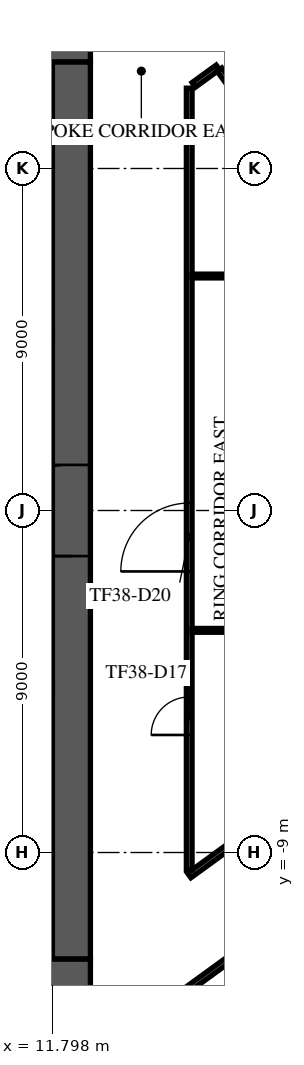
"""IFC4 building model, lengths in metres.
Left out: names, types, materials, properties, quantities, classifications, styles, units other than length and angle.
Written with IfcOpenShell. Run it as: python <this file> out.ifc"""

import sys

from ifc_helpers import new_model, si_unit, direction, frame, frame_2d, origin, place, context, subcontext, project, spatial, rectangle, extrude, element, fill, save


model = new_model("IFC4")
c1 = context("Model", 3, precision=1e-05, world=origin(), true_north=direction((0.0, 1.0)))
c2 = subcontext(c1, "Body", "Model", "MODEL_VIEW")
j1 = project(units=[si_unit("LENGTHUNIT", "METRE"), si_unit("PLANEANGLEUNIT", "RADIAN")], contexts=[c1])
p1 = place(None, origin())
s1 = spatial("IfcSite", under=j1, at=p1, CompositionType="ELEMENT")
p2 = place(p1, origin())
s2 = spatial("IfcBuilding", under=s1, at=p2, CompositionType="ELEMENT")
p3 = place(p2, frame((0.0, 0.0, 163.7)))
s3 = spatial("IfcBuildingStorey", under=s2, at=p3, CompositionType="ELEMENT", Elevation=163.7)
p4 = place(p3, frame((-12.8, 12.3, 0.0), z_axis=(0.0, 0.0, 1.0), x_axis=(1.0, 0.0, 0.0)))
e1 = element("IfcWall", 1, at=p4, inside=s3, PredefinedType="SHEAR", context=c2, shape_type="SweptSolid", body=[
    extrude(rectangle(XDim=25.6, YDim=1.0, at=frame_2d((12.8, 0.0))), origin(), (0.0, 0.0, 1.0), 3.6),
])
p5 = place(p4, frame((11.6, 0.0, 0.0)))
e2 = element("IfcOpeningElement", 2, at=p5, cuts=e1, PredefinedType="OPENING", context=c2, shape_type="SweptSolid", body=[
    extrude(rectangle(XDim=2.4, YDim=2.4, at=frame_2d((1.2, 1.2))), frame((0.0, 0.51, 0.0), z_axis=(0.0, -1.0, 0.0), x_axis=(1.0, 0.0, 0.0)), (0.0, 0.0, 1.0), 1.02),
])
p6 = place(p4, frame((22.425, 0.0, 0.0)))
e3 = element("IfcOpeningElement", 3, at=p6, cuts=e1, PredefinedType="OPENING", context=c2, shape_type="SweptSolid", body=[
    extrude(rectangle(XDim=1.2, YDim=2.1, at=frame_2d((0.6, 1.05))), frame((0.0, 0.51, 0.0), z_axis=(0.0, -1.0, 0.0), x_axis=(1.0, 0.0, 0.0)), (0.0, 0.0, 1.0), 1.02),
])
p7 = place(p4, frame((1.4, 0.0, 0.0)))
e4 = element("IfcOpeningElement", 4, at=p7, cuts=e1, PredefinedType="OPENING", context=c2, shape_type="SweptSolid", body=[
    extrude(rectangle(XDim=1.0, YDim=2.1, at=frame_2d((0.5, 1.05))), frame((0.0, 0.51, 0.0), z_axis=(0.0, -1.0, 0.0), x_axis=(1.0, 0.0, 0.0)), (0.0, 0.0, 1.0), 1.02),
])
p8 = place(p3, frame((-12.8, -12.3, 0.0), z_axis=(0.0, 0.0, 1.0), x_axis=(1.0, 0.0, 0.0)))
e5 = element("IfcWall", 5, at=p8, inside=s3, PredefinedType="SHEAR", context=c2, shape_type="SweptSolid", body=[
    extrude(rectangle(XDim=25.6, YDim=1.0, at=frame_2d((12.8, 0.0))), origin(), (0.0, 0.0, 1.0), 3.6),
])
p9 = place(p8, frame((7.7, 0.0, 0.0)))
e6 = element("IfcOpeningElement", 6, at=p9, cuts=e5, PredefinedType="OPENING", context=c2, shape_type="SweptSolid", body=[
    extrude(rectangle(XDim=2.0, YDim=2.1, at=frame_2d((1.0, 1.05))), frame((0.0, 0.51, 0.0), z_axis=(0.0, -1.0, 0.0), x_axis=(1.0, 0.0, 0.0)), (0.0, 0.0, 1.0), 1.02),
])
p10 = place(p8, frame((17.825, 0.0, 0.0)))
e7 = element("IfcOpeningElement", 7, at=p10, cuts=e5, PredefinedType="OPENING", context=c2, shape_type="SweptSolid", body=[
    extrude(rectangle(XDim=1.2, YDim=2.1, at=frame_2d((0.6, 1.05))), frame((0.0, 0.51, 0.0), z_axis=(0.0, -1.0, 0.0), x_axis=(1.0, 0.0, 0.0)), (0.0, 0.0, 1.0), 1.02),
])
p11 = place(p8, frame((1.975, 0.0, 0.0)))
e8 = element("IfcOpeningElement", 8, at=p11, cuts=e5, PredefinedType="OPENING", context=c2, shape_type="SweptSolid", body=[
    extrude(rectangle(XDim=1.2, YDim=2.1, at=frame_2d((0.6, 1.05))), frame((0.0, 0.51, 0.0), z_axis=(0.0, -1.0, 0.0), x_axis=(1.0, 0.0, 0.0)), (0.0, 0.0, 1.0), 1.02),
])
p12 = place(p8, frame((22.425, 0.0, 0.0)))
e9 = element("IfcOpeningElement", 9, at=p12, cuts=e5, PredefinedType="OPENING", context=c2, shape_type="SweptSolid", body=[
    extrude(rectangle(XDim=1.2, YDim=2.1, at=frame_2d((0.6, 1.05))), frame((0.0, 0.51, 0.0), z_axis=(0.0, -1.0, 0.0), x_axis=(1.0, 0.0, 0.0)), (0.0, 0.0, 1.0), 1.02),
])
p13 = place(p3, frame((12.3, -11.8, 0.0), z_axis=(0.0, 0.0, 1.0), x_axis=(0.0, 1.0, 0.0)))
e10 = element("IfcWall", 10, at=p13, inside=s3, PredefinedType="SHEAR", context=c2, shape_type="SweptSolid", body=[
    extrude(rectangle(XDim=23.6, YDim=1.0, at=frame_2d((11.8, 0.0))), origin(), (0.0, 0.0, 1.0), 3.6),
])
p14 = place(p13, frame((10.6, 0.0, 0.0)))
e11 = element("IfcOpeningElement", 11, at=p14, cuts=e10, PredefinedType="OPENING", context=c2, shape_type="SweptSolid", body=[
    extrude(rectangle(XDim=2.4, YDim=2.4, at=frame_2d((1.2, 1.2))), frame((0.0, 0.51, 0.0), z_axis=(0.0, -1.0, 0.0), x_axis=(1.0, 0.0, 0.0)), (0.0, 0.0, 1.0), 1.02),
])
for number, where, z_axis, x_axis in (
    (12, (8.65, 4.675, 0.0), (0.0, 0.0, 1.0), (1.0, 0.0, 0.0)),
    (13, (8.65, -4.675, 0.0), (0.0, 0.0, 1.0), (1.0, 0.0, 0.0)),
):
    element("IfcWall", number, at=place(p3, frame(where, z_axis=z_axis, x_axis=x_axis)), inside=s3, PredefinedType="SOLIDWALL", context=c2, shape_type="SweptSolid", body=[
        extrude(rectangle(XDim=3.15, YDim=0.25, at=frame_2d((1.575, 0.0))), origin(), (0.0, 0.0, 1.0), 3.6),
    ])
p15 = place(p3, frame((-4.784, -35.737, 0.0), z_axis=(0.0, 0.0, 1.0), x_axis=(0.809019283075, 0.587782102154, 0.0)))
e14 = element("IfcWall", 14, at=p15, inside=s3, PredefinedType="STANDARD", context=c2, shape_type="SweptSolid", body=[
    extrude(rectangle(XDim=49.751, YDim=0.6, at=frame_2d((24.875, 0.0))), origin(), (0.0, 0.0, 1.0), 3.6),
])
p16 = place(p15, frame((1.161, 0.0, 0.9)))
e15 = element("IfcOpeningElement", 15, at=p16, cuts=e14, PredefinedType="OPENING", context=c2, shape_type="SweptSolid", body=[
    extrude(rectangle(XDim=2.1, YDim=2.1, at=frame_2d((1.05, 1.05))), frame((0.0, 0.31, 0.0), z_axis=(0.0, -1.0, 0.0), x_axis=(1.0, 0.0, 0.0)), (0.0, 0.0, 1.0), 0.62),
])
p17 = place(p15, frame((5.644, 0.0, 0.9)))
e16 = element("IfcOpeningElement", 16, at=p17, cuts=e14, PredefinedType="OPENING", context=c2, shape_type="SweptSolid", body=[
    extrude(rectangle(XDim=2.1, YDim=2.1, at=frame_2d((1.05, 1.05))), frame((0.0, 0.31, 0.0), z_axis=(0.0, -1.0, 0.0), x_axis=(1.0, 0.0, 0.0)), (0.0, 0.0, 1.0), 0.62),
])
p18 = place(p15, frame((10.189, 0.0, 0.9)))
e17 = element("IfcOpeningElement", 17, at=p18, cuts=e14, PredefinedType="OPENING", context=c2, shape_type="SweptSolid", body=[
    extrude(rectangle(XDim=2.1, YDim=2.1, at=frame_2d((1.05, 1.05))), frame((0.0, 0.31, 0.0), z_axis=(0.0, -1.0, 0.0), x_axis=(1.0, 0.0, 0.0)), (0.0, 0.0, 1.0), 0.62),
])
p19 = place(p15, frame((14.735, 0.0, 0.9)))
e18 = element("IfcOpeningElement", 18, at=p19, cuts=e14, PredefinedType="OPENING", context=c2, shape_type="SweptSolid", body=[
    extrude(rectangle(XDim=2.1, YDim=2.1, at=frame_2d((1.05, 1.05))), frame((0.0, 0.31, 0.0), z_axis=(0.0, -1.0, 0.0), x_axis=(1.0, 0.0, 0.0)), (0.0, 0.0, 1.0), 0.62),
])
p20 = place(p15, frame((19.28, 0.0, 0.9)))
e19 = element("IfcOpeningElement", 19, at=p20, cuts=e14, PredefinedType="OPENING", context=c2, shape_type="SweptSolid", body=[
    extrude(rectangle(XDim=2.1, YDim=2.1, at=frame_2d((1.05, 1.05))), frame((0.0, 0.31, 0.0), z_axis=(0.0, -1.0, 0.0), x_axis=(1.0, 0.0, 0.0)), (0.0, 0.0, 1.0), 0.62),
])
p21 = place(p15, frame((23.826, 0.0, 0.9)))
e20 = element("IfcOpeningElement", 20, at=p21, cuts=e14, PredefinedType="OPENING", context=c2, shape_type="SweptSolid", body=[
    extrude(rectangle(XDim=2.1, YDim=2.1, at=frame_2d((1.05, 1.05))), frame((0.0, 0.31, 0.0), z_axis=(0.0, -1.0, 0.0), x_axis=(1.0, 0.0, 0.0)), (0.0, 0.0, 1.0), 0.62),
])
p22 = place(p15, frame((28.371, 0.0, 0.9)))
e21 = element("IfcOpeningElement", 21, at=p22, cuts=e14, PredefinedType="OPENING", context=c2, shape_type="SweptSolid", body=[
    extrude(rectangle(XDim=2.1, YDim=2.1, at=frame_2d((1.05, 1.05))), frame((0.0, 0.31, 0.0), z_axis=(0.0, -1.0, 0.0), x_axis=(1.0, 0.0, 0.0)), (0.0, 0.0, 1.0), 0.62),
])
p23 = place(p15, frame((32.917, 0.0, 0.9)))
e22 = element("IfcOpeningElement", 22, at=p23, cuts=e14, PredefinedType="OPENING", context=c2, shape_type="SweptSolid", body=[
    extrude(rectangle(XDim=2.1, YDim=2.1, at=frame_2d((1.05, 1.05))), frame((0.0, 0.31, 0.0), z_axis=(0.0, -1.0, 0.0), x_axis=(1.0, 0.0, 0.0)), (0.0, 0.0, 1.0), 0.62),
])
p24 = place(p15, frame((37.462, 0.0, 0.9)))
e23 = element("IfcOpeningElement", 23, at=p24, cuts=e14, PredefinedType="OPENING", context=c2, shape_type="SweptSolid", body=[
    extrude(rectangle(XDim=2.1, YDim=2.1, at=frame_2d((1.05, 1.05))), frame((0.0, 0.31, 0.0), z_axis=(0.0, -1.0, 0.0), x_axis=(1.0, 0.0, 0.0)), (0.0, 0.0, 1.0), 0.62),
])
p25 = place(p15, frame((42.008, 0.0, 0.9)))
e24 = element("IfcOpeningElement", 24, at=p25, cuts=e14, PredefinedType="OPENING", context=c2, shape_type="SweptSolid", body=[
    extrude(rectangle(XDim=2.1, YDim=2.1, at=frame_2d((1.05, 1.05))), frame((0.0, 0.31, 0.0), z_axis=(0.0, -1.0, 0.0), x_axis=(1.0, 0.0, 0.0)), (0.0, 0.0, 1.0), 0.62),
])
p26 = place(p15, frame((46.491, 0.0, 0.9)))
e25 = element("IfcOpeningElement", 25, at=p26, cuts=e14, PredefinedType="OPENING", context=c2, shape_type="SweptSolid", body=[
    extrude(rectangle(XDim=2.1, YDim=2.1, at=frame_2d((1.05, 1.05))), frame((0.0, 0.31, 0.0), z_axis=(0.0, -1.0, 0.0), x_axis=(1.0, 0.0, 0.0)), (0.0, 0.0, 1.0), 0.62),
])
p27 = place(p3, frame((36.533, 0.245, 0.0), z_axis=(0.0, 0.0, 1.0), x_axis=(-0.58778579343, 0.809016601215, 0.0)))
e26 = element("IfcWall", 26, at=p27, inside=s3, PredefinedType="STANDARD", context=c2, shape_type="SweptSolid", body=[
    extrude(rectangle(XDim=42.176, YDim=0.6, at=frame_2d((21.088, 0.0))), origin(), (0.0, 0.0, 1.0), 3.6),
])
p28 = place(p27, frame((1.138, 0.0, 0.9)))
e27 = element("IfcOpeningElement", 27, at=p28, cuts=e26, PredefinedType="OPENING", context=c2, shape_type="SweptSolid", body=[
    extrude(rectangle(XDim=2.3, YDim=2.1, at=frame_2d((1.15, 1.05))), frame((0.0, 0.31, 0.0), z_axis=(0.0, -1.0, 0.0), x_axis=(1.0, 0.0, 0.0)), (0.0, 0.0, 1.0), 0.62),
])
p29 = place(p27, frame((5.776, 0.0, 0.9)))
e28 = element("IfcOpeningElement", 28, at=p29, cuts=e26, PredefinedType="OPENING", context=c2, shape_type="SweptSolid", body=[
    extrude(rectangle(XDim=2.3, YDim=2.1, at=frame_2d((1.15, 1.05))), frame((0.0, 0.31, 0.0), z_axis=(0.0, -1.0, 0.0), x_axis=(1.0, 0.0, 0.0)), (0.0, 0.0, 1.0), 0.62),
])
p30 = place(p27, frame((10.476, 0.0, 0.9)))
e29 = element("IfcOpeningElement", 29, at=p30, cuts=e26, PredefinedType="OPENING", context=c2, shape_type="SweptSolid", body=[
    extrude(rectangle(XDim=2.3, YDim=2.1, at=frame_2d((1.15, 1.05))), frame((0.0, 0.31, 0.0), z_axis=(0.0, -1.0, 0.0), x_axis=(1.0, 0.0, 0.0)), (0.0, 0.0, 1.0), 0.62),
])
p31 = place(p27, frame((15.176, 0.0, 0.9)))
e30 = element("IfcOpeningElement", 30, at=p31, cuts=e26, PredefinedType="OPENING", context=c2, shape_type="SweptSolid", body=[
    extrude(rectangle(XDim=2.3, YDim=2.1, at=frame_2d((1.15, 1.05))), frame((0.0, 0.31, 0.0), z_axis=(0.0, -1.0, 0.0), x_axis=(1.0, 0.0, 0.0)), (0.0, 0.0, 1.0), 0.62),
])
p32 = place(p27, frame((19.876, 0.0, 0.9)))
e31 = element("IfcOpeningElement", 31, at=p32, cuts=e26, PredefinedType="OPENING", context=c2, shape_type="SweptSolid", body=[
    extrude(rectangle(XDim=2.3, YDim=2.1, at=frame_2d((1.15, 1.05))), frame((0.0, 0.31, 0.0), z_axis=(0.0, -1.0, 0.0), x_axis=(1.0, 0.0, 0.0)), (0.0, 0.0, 1.0), 0.62),
])
p33 = place(p27, frame((24.576, 0.0, 0.9)))
e32 = element("IfcOpeningElement", 32, at=p33, cuts=e26, PredefinedType="OPENING", context=c2, shape_type="SweptSolid", body=[
    extrude(rectangle(XDim=2.3, YDim=2.1, at=frame_2d((1.15, 1.05))), frame((0.0, 0.31, 0.0), z_axis=(0.0, -1.0, 0.0), x_axis=(1.0, 0.0, 0.0)), (0.0, 0.0, 1.0), 0.62),
])
p34 = place(p27, frame((29.276, 0.0, 0.9)))
e33 = element("IfcOpeningElement", 33, at=p34, cuts=e26, PredefinedType="OPENING", context=c2, shape_type="SweptSolid", body=[
    extrude(rectangle(XDim=2.3, YDim=2.1, at=frame_2d((1.15, 1.05))), frame((0.0, 0.31, 0.0), z_axis=(0.0, -1.0, 0.0), x_axis=(1.0, 0.0, 0.0)), (0.0, 0.0, 1.0), 0.62),
])
p35 = place(p27, frame((33.976, 0.0, 0.9)))
e34 = element("IfcOpeningElement", 34, at=p35, cuts=e26, PredefinedType="OPENING", context=c2, shape_type="SweptSolid", body=[
    extrude(rectangle(XDim=2.3, YDim=2.1, at=frame_2d((1.15, 1.05))), frame((0.0, 0.31, 0.0), z_axis=(0.0, -1.0, 0.0), x_axis=(1.0, 0.0, 0.0)), (0.0, 0.0, 1.0), 0.62),
])
p36 = place(p27, frame((38.676, 0.0, 0.9)))
e35 = element("IfcOpeningElement", 35, at=p36, cuts=e26, PredefinedType="OPENING", context=c2, shape_type="SweptSolid", body=[
    extrude(rectangle(XDim=2.3, YDim=2.1, at=frame_2d((1.15, 1.05))), frame((0.0, 0.31, 0.0), z_axis=(0.0, -1.0, 0.0), x_axis=(1.0, 0.0, 0.0)), (0.0, 0.0, 1.0), 0.62),
])
p37 = place(p3, frame((-3.509, -26.309, 0.0), z_axis=(0.0, 0.0, 1.0), x_axis=(0.809024097608, 0.587775475407, 0.0)))
e36 = element("IfcWall", 36, at=p37, inside=s3, PredefinedType="PARTITIONING", context=c2, shape_type="SweptSolid", body=[
    extrude(rectangle(XDim=36.68, YDim=0.15, at=frame_2d((18.34, 0.0))), origin(), (0.0, 0.0, 1.0), 3.15),
])
p38 = place(p37, frame((5.361, 0.0, 0.0)))
e37 = element("IfcOpeningElement", 37, at=p38, cuts=e36, PredefinedType="OPENING", context=c2, shape_type="SweptSolid", body=[
    extrude(rectangle(XDim=1.0, YDim=2.1, at=frame_2d((0.5, 1.05))), frame((0.0, 0.085, 0.0), z_axis=(0.0, -1.0, 0.0), x_axis=(1.0, 0.0, 0.0)), (0.0, 0.0, 1.0), 0.17),
])
p39 = place(p37, frame((12.913, 0.0, 0.0)))
e38 = element("IfcOpeningElement", 38, at=p39, cuts=e36, PredefinedType="OPENING", context=c2, shape_type="SweptSolid", body=[
    extrude(rectangle(XDim=1.0, YDim=2.1, at=frame_2d((0.5, 1.05))), frame((0.0, 0.085, 0.0), z_axis=(0.0, -1.0, 0.0), x_axis=(1.0, 0.0, 0.0)), (0.0, 0.0, 1.0), 0.17),
])
p40 = place(p37, frame((27.576, 0.0, 0.0)))
e39 = element("IfcOpeningElement", 39, at=p40, cuts=e36, PredefinedType="OPENING", context=c2, shape_type="SweptSolid", body=[
    extrude(rectangle(XDim=1.0, YDim=2.1, at=frame_2d((0.5, 1.05))), frame((0.0, 0.085, 0.0), z_axis=(0.0, -1.0, 0.0), x_axis=(1.0, 0.0, 0.0)), (0.0, 0.0, 1.0), 0.17),
])
p41 = place(p3, frame((9.681, 24.652, 0.0), z_axis=(0.0, 0.0, 1.0), x_axis=(0.58776328895, -0.809032951222, 0.0)))
e40 = element("IfcWall", 40, at=p41, inside=s3, PredefinedType="PARTITIONING", context=c2, shape_type="SweptSolid", body=[
    extrude(rectangle(XDim=28.583, YDim=0.15, at=frame_2d((14.291, 0.0))), origin(), (0.0, 0.0, 1.0), 3.15),
])
p42 = place(p41, frame((12.256, 0.0, 0.0)))
e41 = element("IfcOpeningElement", 41, at=p42, cuts=e40, PredefinedType="OPENING", context=c2, shape_type="SweptSolid", body=[
    extrude(rectangle(XDim=1.0, YDim=2.1, at=frame_2d((0.5, 1.05))), frame((0.0, 0.085, 0.0), z_axis=(0.0, -1.0, 0.0), x_axis=(1.0, 0.0, 0.0)), (0.0, 0.0, 1.0), 0.17),
])
p43 = place(p3, frame((15.4, -9.604, 0.0), z_axis=(0.0, 0.0, 1.0), x_axis=(0.809039975854, 0.5877536197, 0.0)))
e42 = element("IfcWall", 42, at=p43, inside=s3, PredefinedType="PARTITIONING", context=c2, shape_type="SweptSolid", body=[
    extrude(rectangle(XDim=11.564, YDim=0.15, at=frame_2d((5.782, 0.0))), origin(), (0.0, 0.0, 1.0), 3.15),
])
p44 = place(p3, frame((15.4, -9.457, 0.0), z_axis=(0.0, 0.0, 1.0), x_axis=(0.0, 1.0, 0.0)))
e43 = element("IfcWall", 43, at=p44, inside=s3, PredefinedType="PARTITIONING", context=c2, shape_type="SweptSolid", body=[
    extrude(rectangle(XDim=20.571, YDim=0.15, at=frame_2d((10.285, 0.0))), origin(), (0.0, 0.0, 1.0), 3.15),
])
p45 = place(p44, frame((3.55, 0.0, 0.0)))
e44 = element("IfcOpeningElement", 44, at=p45, cuts=e43, PredefinedType="OPENING", context=c2, shape_type="SweptSolid", body=[
    extrude(rectangle(XDim=1.0, YDim=2.1, at=frame_2d((0.5, 1.05))), frame((0.0, 0.085, 0.0), z_axis=(0.0, -1.0, 0.0), x_axis=(1.0, 0.0, 0.0)), (0.0, 0.0, 1.0), 0.17),
])
p46 = place(p44, frame((7.853, 0.0, 0.0)))
e45 = element("IfcOpeningElement", 45, at=p46, cuts=e43, PredefinedType="OPENING", context=c2, shape_type="SweptSolid", body=[
    extrude(rectangle(XDim=1.8, YDim=2.1, at=frame_2d((0.9, 1.05))), frame((0.0, 0.085, 0.0), z_axis=(0.0, -1.0, 0.0), x_axis=(1.0, 0.0, 0.0)), (0.0, 0.0, 1.0), 0.17),
])
p47 = place(p3, frame((15.519, 11.2, 0.0), z_axis=(0.0, 0.0, 1.0), x_axis=(0.809140088661, 0.587615790225, 0.0)))
e46 = element("IfcWall", 46, at=p47, inside=s3, PredefinedType="PARTITIONING", context=c2, shape_type="SweptSolid", body=[
    extrude(rectangle(XDim=0.784, YDim=0.15, at=frame_2d((0.392, 0.0))), origin(), (0.0, 0.0, 1.0), 3.6),
])
p48 = place(p3, frame((16.197, 11.6, 0.0), z_axis=(0.0, 0.0, 1.0), x_axis=(0.587765569966, -0.809031294057, 0.0)))
e47 = element("IfcWall", 47, at=p48, inside=s3, PredefinedType="PARTITIONING", context=c2, shape_type="SweptSolid", body=[
    extrude(rectangle(XDim=14.193, YDim=0.15, at=frame_2d((7.096, 0.0))), origin(), (0.0, 0.0, 1.0), 3.15),
])
p49 = place(p48, frame((0.3, 0.0, 0.0)))
e48 = element("IfcOpeningElement", 48, at=p49, cuts=e47, PredefinedType="OPENING", context=c2, shape_type="SweptSolid", body=[
    extrude(rectangle(XDim=1.0, YDim=2.1, at=frame_2d((0.5, 1.05))), frame((0.0, 0.085, 0.0), z_axis=(0.0, -1.0, 0.0), x_axis=(1.0, 0.0, 0.0)), (0.0, 0.0, 1.0), 0.17),
])
p50 = place(p48, frame((11.26, 0.0, 0.0)))
e49 = element("IfcOpeningElement", 49, at=p50, cuts=e47, PredefinedType="OPENING", context=c2, shape_type="SweptSolid", body=[
    extrude(rectangle(XDim=1.0, YDim=2.1, at=frame_2d((0.5, 1.05))), frame((0.0, 0.085, 0.0), z_axis=(0.0, -1.0, 0.0), x_axis=(1.0, 0.0, 0.0)), (0.0, 0.0, 1.0), 0.17),
])
p51 = place(p3, frame((15.475, -3.154, 0.0), z_axis=(0.0, 0.0, 1.0), x_axis=(1.0, 0.0, 0.0)))
e50 = element("IfcWall", 50, at=p51, inside=s3, PredefinedType="PARTITIONING", context=c2, shape_type="SweptSolid", body=[
    extrude(rectangle(XDim=4.057, YDim=0.1, at=frame_2d((2.028, 0.0))), origin(), (0.0, 0.0, 1.0), 3.6),
])
p52 = place(p3, frame((15.475, 6.17, 0.0), z_axis=(0.0, 0.0, 1.0), x_axis=(1.0, 0.0, 0.0)))
e51 = element("IfcWall", 51, at=p52, inside=s3, PredefinedType="PARTITIONING", context=c2, shape_type="SweptSolid", body=[
    extrude(rectangle(XDim=3.387, YDim=0.1, at=frame_2d((1.693, 0.0))), origin(), (0.0, 0.0, 1.0), 3.6),
])
p53 = place(p14, origin())
e52 = element("IfcDoor", 52, at=p53, inside=s3, OperationType="SINGLE_SWING_LEFT", PredefinedType="DOOR", context=c2, shape_type="SweptSolid", body=[
    extrude(rectangle(XDim=2.4, YDim=2.4, at=frame_2d((1.2, 1.2))), frame((0.0, 0.025, 0.0), z_axis=(0.0, -1.0, 0.0), x_axis=(1.0, 0.0, 0.0)), (0.0, 0.0, 1.0), 0.05),
])
fill(e11, e52)
p54 = place(p45, frame((1.0, 0.0, 0.0), z_axis=(0.0, 0.0, 1.0), x_axis=(-1.0, 0.0, 0.0)))
e53 = element("IfcDoor", 53, at=p54, inside=s3, OperationType="SINGLE_SWING_LEFT", PredefinedType="DOOR", context=c2, shape_type="SweptSolid", body=[
    extrude(rectangle(XDim=1.0, YDim=2.1, at=frame_2d((0.5, 1.05))), frame((0.0, 0.025, 0.0), z_axis=(0.0, -1.0, 0.0), x_axis=(1.0, 0.0, 0.0)), (0.0, 0.0, 1.0), 0.05),
])
fill(e44, e53)
p55 = place(p46, frame((1.8, 0.0, 0.0), z_axis=(0.0, 0.0, 1.0), x_axis=(-1.0, 0.0, 0.0)))
e54 = element("IfcDoor", 54, at=p55, inside=s3, OperationType="DOUBLE_DOOR_SINGLE_SWING", PredefinedType="DOOR", context=c2, shape_type="SweptSolid", body=[
    extrude(rectangle(XDim=1.8, YDim=2.1, at=frame_2d((0.9, 1.05))), frame((0.0, 0.025, 0.0), z_axis=(0.0, -1.0, 0.0), x_axis=(1.0, 0.0, 0.0)), (0.0, 0.0, 1.0), 0.05),
])
fill(e45, e54)
save(model, sys.argv[1])
